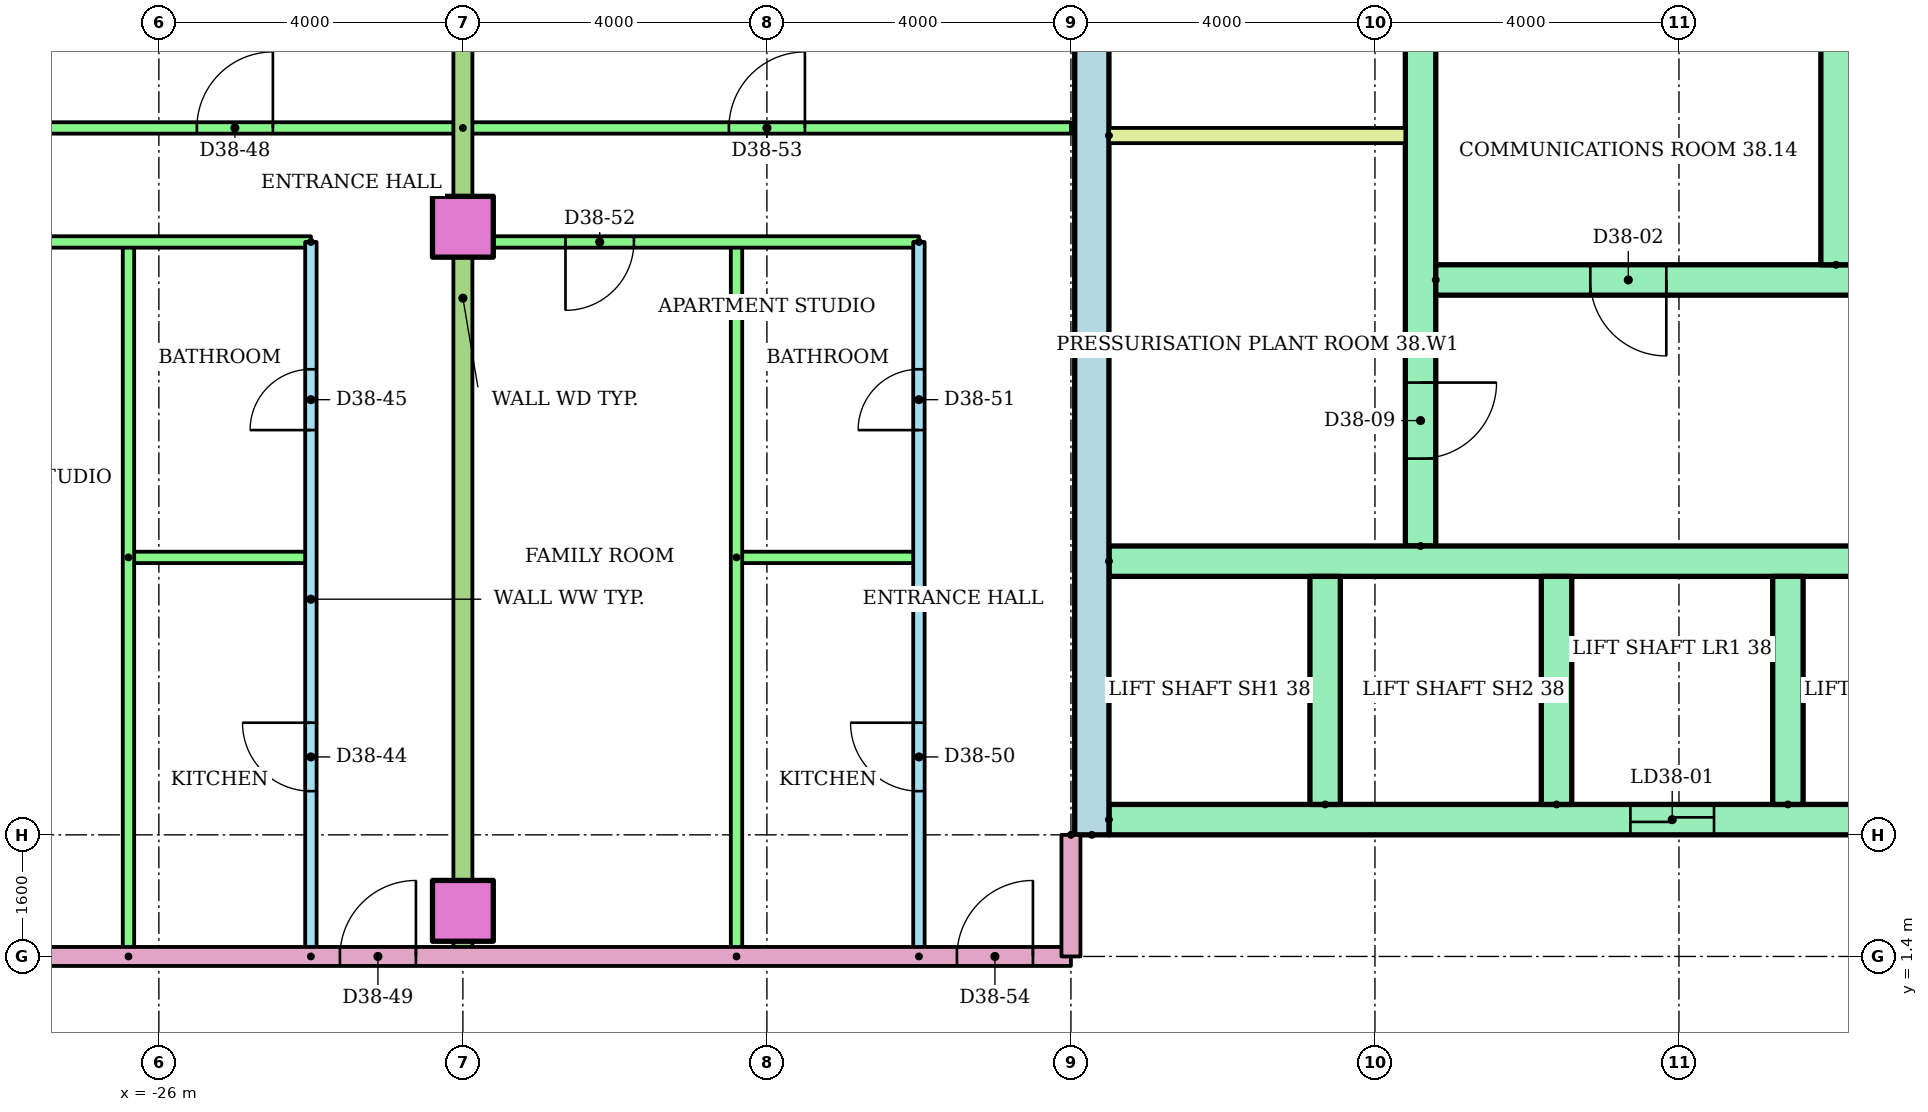
"""IFC4 building model, lengths in metres.
Left out: names, types, materials, properties, quantities, classifications, styles, units other than length and angle.
Written with IfcOpenShell. Run it as: python <this file> out.ifc"""

import sys

from ifc_helpers import new_model, si_unit, direction, frame, frame_2d, origin, origin_2d, place, context, subcontext, project, spatial, rectangle, extrude, element, fill, save


model = new_model("IFC4")
c1 = context("Model", 3, precision=1e-05, world=origin(), true_north=direction((0.0, 1.0)))
c2 = subcontext(c1, "Body", "Model", "MODEL_VIEW")
j1 = project(units=[si_unit("LENGTHUNIT", "METRE"), si_unit("PLANEANGLEUNIT", "RADIAN")], contexts=[c1])
p1 = place(None, origin())
s1 = spatial("IfcSite", under=j1, at=p1, CompositionType="ELEMENT")
p2 = place(p1, origin())
s2 = spatial("IfcBuilding", under=s1, at=p2, CompositionType="ELEMENT")
p3 = place(p2, frame((0.0, 0.0, 145.4)))
s3 = spatial("IfcBuildingStorey", under=s2, at=p3, CompositionType="ELEMENT", Elevation=145.4)
for number, where in (
    (1, (-22.0, 2.0, 0.0)),
    (2, (-22.0, 11.0, 0.0)),
):
    element("IfcColumn", number, at=place(p3, frame(where)), inside=s3, PredefinedType="COLUMN", context=c2, shape_type="SweptSolid", body=[
        extrude(rectangle(XDim=0.8, YDim=0.8, at=origin_2d()), origin(), (0.0, 0.0, 1.0), 3.2),
    ])
p4 = place(p3, frame((-13.725, 3.0, 0.0), z_axis=(0.0, 0.0, 1.0), x_axis=(0.0, 1.0, 0.0)))
e3 = element("IfcWall", 3, at=p4, inside=s3, PredefinedType="SHEAR", context=c2, shape_type="SweptSolid", body=[
    extrude(rectangle(XDim=17.0, YDim=0.45, at=frame_2d((8.5, 0.0))), origin(), (0.0, 0.0, 1.0), 2.92),
])
p5 = place(p3, frame((-9.4, 6.8, 0.0), z_axis=(0.0, 0.0, 1.0), x_axis=(0.0, 1.0, 0.0)))
e4 = element("IfcWall", 4, at=p5, inside=s3, PredefinedType="SHEAR", context=c2, shape_type="SweptSolid", body=[
    extrude(rectangle(XDim=12.7, YDim=0.4, at=frame_2d((6.35, 0.0))), origin(), (0.0, 0.0, 1.0), 2.92),
])
p6 = place(p5, frame((1.15, 0.0, 0.0)))
e5 = element("IfcOpeningElement", 5, at=p6, cuts=e4, PredefinedType="OPENING", context=c2, shape_type="SweptSolid", body=[
    extrude(rectangle(XDim=1.0, YDim=2.1, at=frame_2d((0.5, 1.05))), frame((0.0, 0.21, 0.0), z_axis=(0.0, -1.0, 0.0), x_axis=(1.0, 0.0, 0.0)), (0.0, 0.0, 1.0), 0.42),
])
p7 = place(p5, frame((7.925, 0.0, 0.0)))
e6 = element("IfcOpeningElement", 6, at=p7, cuts=e4, PredefinedType="OPENING", context=c2, shape_type="SweptSolid", body=[
    extrude(rectangle(XDim=1.0, YDim=2.1, at=frame_2d((0.5, 1.05))), frame((0.0, 0.21, 0.0), z_axis=(0.0, -1.0, 0.0), x_axis=(1.0, 0.0, 0.0)), (0.0, 0.0, 1.0), 0.42),
])
p8 = place(p3, frame((-13.5, 3.2, 0.0)))
e7 = element("IfcWall", 7, at=p8, inside=s3, PredefinedType="SHEAR", context=c2, shape_type="SweptSolid", body=[
    extrude(rectangle(XDim=27.0, YDim=0.4, at=frame_2d((13.5, 0.0))), origin(), (0.0, 0.0, 1.0), 2.92),
])
p9 = place(p8, frame((6.861, 0.0, 0.0)))
e8 = element("IfcOpeningElement", 8, at=p9, cuts=e7, PredefinedType="OPENING", context=c2, shape_type="SweptSolid", body=[
    extrude(rectangle(XDim=1.1, YDim=2.1, at=frame_2d((0.55, 1.05))), frame((0.0, 0.21, 0.0), z_axis=(0.0, -1.0, 0.0), x_axis=(1.0, 0.0, 0.0)), (0.0, 0.0, 1.0), 0.42),
])
p10 = place(p8, frame((9.906, 0.0, 0.0)))
e9 = element("IfcOpeningElement", 9, at=p10, cuts=e7, PredefinedType="OPENING", context=c2, shape_type="SweptSolid", body=[
    extrude(rectangle(XDim=1.1, YDim=2.1, at=frame_2d((0.55, 1.05))), frame((0.0, 0.21, 0.0), z_axis=(0.0, -1.0, 0.0), x_axis=(1.0, 0.0, 0.0)), (0.0, 0.0, 1.0), 0.42),
])
p11 = place(p8, frame((15.994, 0.0, 0.0)))
e10 = element("IfcOpeningElement", 10, at=p11, cuts=e7, PredefinedType="OPENING", context=c2, shape_type="SweptSolid", body=[
    extrude(rectangle(XDim=1.1, YDim=2.1, at=frame_2d((0.55, 1.05))), frame((0.0, 0.21, 0.0), z_axis=(0.0, -1.0, 0.0), x_axis=(1.0, 0.0, 0.0)), (0.0, 0.0, 1.0), 0.42),
])
p12 = place(p8, frame((19.039, 0.0, 0.0)))
e11 = element("IfcOpeningElement", 11, at=p12, cuts=e7, PredefinedType="OPENING", context=c2, shape_type="SweptSolid", body=[
    extrude(rectangle(XDim=1.1, YDim=2.1, at=frame_2d((0.55, 1.05))), frame((0.0, 0.21, 0.0), z_axis=(0.0, -1.0, 0.0), x_axis=(1.0, 0.0, 0.0)), (0.0, 0.0, 1.0), 0.42),
])
p13 = place(p8, frame((12.6, 0.0, 0.0)))
e12 = element("IfcOpeningElement", 12, at=p13, cuts=e7, PredefinedType="OPENING", context=c2, shape_type="SweptSolid", body=[
    extrude(rectangle(XDim=1.8, YDim=2.1, at=frame_2d((0.9, 1.05))), frame((0.0, 0.21, 0.0), z_axis=(0.0, -1.0, 0.0), x_axis=(1.0, 0.0, 0.0)), (0.0, 0.0, 1.0), 0.42),
])
p14 = place(p3, frame((-13.5, 6.6, 0.0)))
e13 = element("IfcWall", 13, at=p14, inside=s3, PredefinedType="SHEAR", context=c2, shape_type="SweptSolid", body=[
    extrude(rectangle(XDim=11.978, YDim=0.4, at=frame_2d((5.989, 0.0))), origin(), (0.0, 0.0, 1.0), 2.92),
])
for number, where, z_axis, x_axis in (
    (14, (-10.656, 3.4, 0.0), (0.0, 0.0, 1.0), (0.0, 1.0, 0.0)),
    (15, (-7.611, 3.4, 0.0), (0.0, 0.0, 1.0), (0.0, 1.0, 0.0)),
    (16, (-4.567, 3.4, 0.0), (0.0, 0.0, 1.0), (0.0, 1.0, 0.0)),
):
    element("IfcWall", number, at=place(p3, frame(where, z_axis=z_axis, x_axis=x_axis)), inside=s3, PredefinedType="SHEAR", context=c2, shape_type="SweptSolid", body=[
        extrude(rectangle(XDim=3.0, YDim=0.4, at=frame_2d((1.5, 0.0))), origin(), (0.0, 0.0, 1.0), 2.92),
    ])
p15 = place(p3, frame((-9.2, 10.3, 0.0)))
e17 = element("IfcWall", 17, at=p15, inside=s3, PredefinedType="SHEAR", context=c2, shape_type="SweptSolid", body=[
    extrude(rectangle(XDim=8.0, YDim=0.4, at=frame_2d((4.0, 0.0))), origin(), (0.0, 0.0, 1.0), 2.92),
])
p16 = place(p15, frame((2.033, 0.0, 0.0)))
e18 = element("IfcOpeningElement", 18, at=p16, cuts=e17, PredefinedType="OPENING", context=c2, shape_type="SweptSolid", body=[
    extrude(rectangle(XDim=1.0, YDim=2.1, at=frame_2d((0.5, 1.05))), frame((0.0, 0.21, 0.0), z_axis=(0.0, -1.0, 0.0), x_axis=(1.0, 0.0, 0.0)), (0.0, 0.0, 1.0), 0.42),
])
p17 = place(p15, frame((6.133, 0.0, 0.0)))
e19 = element("IfcOpeningElement", 19, at=p17, cuts=e17, PredefinedType="OPENING", context=c2, shape_type="SweptSolid", body=[
    extrude(rectangle(XDim=1.0, YDim=2.1, at=frame_2d((0.5, 1.05))), frame((0.0, 0.21, 0.0), z_axis=(0.0, -1.0, 0.0), x_axis=(1.0, 0.0, 0.0)), (0.0, 0.0, 1.0), 0.42),
])
p18 = place(p3, frame((-3.933, 10.5, 0.0), z_axis=(0.0, 0.0, 1.0), x_axis=(0.0, 1.0, 0.0)))
e20 = element("IfcWall", 20, at=p18, inside=s3, PredefinedType="SHEAR", context=c2, shape_type="SweptSolid", body=[
    extrude(rectangle(XDim=3.0, YDim=0.4, at=frame_2d((1.5, 0.0))), origin(), (0.0, 0.0, 1.0), 2.92),
])
p19 = place(p3, frame((-13.5, 12.2, 0.0)))
e21 = element("IfcWall", 21, at=p19, inside=s3, PredefinedType="PARTITIONING", context=c2, shape_type="SweptSolid", body=[
    extrude(rectangle(XDim=3.9, YDim=0.2, at=frame_2d((1.95, 0.0))), origin(), (0.0, 0.0, 1.0), 2.92),
])
p20 = place(p3, frame((-24.0, 1.4, 0.0), z_axis=(0.0, 0.0, 1.0), x_axis=(0.0, 1.0, 0.0)))
e22 = element("IfcWall", 22, at=p20, inside=s3, PredefinedType="PARTITIONING", context=c2, shape_type="SweptSolid", body=[
    extrude(rectangle(XDim=9.4, YDim=0.15, at=frame_2d((4.7, 0.0))), origin(), (0.0, 0.0, 1.0), 2.4),
])
p21 = place(p20, frame((2.175, 0.0, 0.0)))
e23 = element("IfcOpeningElement", 23, at=p21, cuts=e22, PredefinedType="OPENING", context=c2, shape_type="SweptSolid", body=[
    extrude(rectangle(XDim=0.9, YDim=2.1, at=frame_2d((0.45, 1.05))), frame((0.0, 0.085, 0.0), z_axis=(0.0, -1.0, 0.0), x_axis=(1.0, 0.0, 0.0)), (0.0, 0.0, 1.0), 0.17),
])
p22 = place(p20, frame((6.925, 0.0, 0.0)))
e24 = element("IfcOpeningElement", 24, at=p22, cuts=e22, PredefinedType="OPENING", context=c2, shape_type="SweptSolid", body=[
    extrude(rectangle(XDim=0.8, YDim=2.1, at=frame_2d((0.4, 1.05))), frame((0.0, 0.085, 0.0), z_axis=(0.0, -1.0, 0.0), x_axis=(1.0, 0.0, 0.0)), (0.0, 0.0, 1.0), 0.17),
])
p23 = place(p3, frame((-26.4, 6.65, 0.0)))
e25 = element("IfcWall", 25, at=p23, inside=s3, PredefinedType="PARTITIONING", context=c2, shape_type="SweptSolid", body=[
    extrude(rectangle(XDim=2.4, YDim=0.15, at=frame_2d((1.2, 0.0))), origin(), (0.0, 0.0, 1.0), 2.4),
])
p24 = place(p3, frame((-26.4, 1.4, 0.0), z_axis=(0.0, 0.0, 1.0), x_axis=(0.0, 1.0, 0.0)))
e26 = element("IfcWall", 26, at=p24, inside=s3, PredefinedType="PARTITIONING", context=c2, shape_type="SweptSolid", body=[
    extrude(rectangle(XDim=9.4, YDim=0.15, at=frame_2d((4.7, 0.0))), origin(), (0.0, 0.0, 1.0), 2.4),
])
p25 = place(p3, frame((-24.0, 10.8, 0.0), z_axis=(0.0, 0.0, 1.0), x_axis=(-1.0, 0.0, 0.0)))
e27 = element("IfcWall", 27, at=p25, inside=s3, PredefinedType="PARTITIONING", context=c2, shape_type="SweptSolid", body=[
    extrude(rectangle(XDim=8.72, YDim=0.15, at=frame_2d((4.36, 0.0))), origin(), (0.0, 0.0, 1.0), 2.4),
])
p26 = place(p25, frame((4.482, 0.0, 0.0)))
e28 = element("IfcOpeningElement", 28, at=p26, cuts=e27, PredefinedType="OPENING", context=c2, shape_type="SweptSolid", body=[
    extrude(rectangle(XDim=0.9, YDim=2.1, at=frame_2d((0.45, 1.05))), frame((0.0, 0.085, 0.0), z_axis=(0.0, -1.0, 0.0), x_axis=(1.0, 0.0, 0.0)), (0.0, 0.0, 1.0), 0.17),
])
p27 = place(p3, frame((-32.72, 12.3, 0.0)))
e29 = element("IfcWall", 29, at=p27, inside=s3, PredefinedType="PARTITIONING", context=c2, shape_type="SweptSolid", body=[
    extrude(rectangle(XDim=10.72, YDim=0.15, at=frame_2d((5.36, 0.0))), origin(), (0.0, 0.0, 1.0), 2.4),
])
p28 = place(p27, frame((1.102, 0.0, 0.0)))
e30 = element("IfcOpeningElement", 30, at=p28, cuts=e29, PredefinedType="OPENING", context=c2, shape_type="SweptSolid", body=[
    extrude(rectangle(XDim=1.0, YDim=2.1, at=frame_2d((0.5, 1.05))), frame((0.0, 0.085, 0.0), z_axis=(0.0, -1.0, 0.0), x_axis=(1.0, 0.0, 0.0)), (0.0, 0.0, 1.0), 0.17),
])
p29 = place(p27, frame((7.22, 0.0, 0.0)))
e31 = element("IfcOpeningElement", 31, at=p29, cuts=e29, PredefinedType="OPENING", context=c2, shape_type="SweptSolid", body=[
    extrude(rectangle(XDim=1.0, YDim=2.1, at=frame_2d((0.5, 1.05))), frame((0.0, 0.085, 0.0), z_axis=(0.0, -1.0, 0.0), x_axis=(1.0, 0.0, 0.0)), (0.0, 0.0, 1.0), 0.17),
])
p30 = place(p3, frame((-16.0, 1.4, 0.0), z_axis=(0.0, 0.0, 1.0), x_axis=(0.0, 1.0, 0.0)))
e32 = element("IfcWall", 32, at=p30, inside=s3, PredefinedType="PARTITIONING", context=c2, shape_type="SweptSolid", body=[
    extrude(rectangle(XDim=9.4, YDim=0.15, at=frame_2d((4.7, 0.0))), origin(), (0.0, 0.0, 1.0), 2.4),
])
p31 = place(p30, frame((2.175, 0.0, 0.0)))
e33 = element("IfcOpeningElement", 33, at=p31, cuts=e32, PredefinedType="OPENING", context=c2, shape_type="SweptSolid", body=[
    extrude(rectangle(XDim=0.9, YDim=2.1, at=frame_2d((0.45, 1.05))), frame((0.0, 0.085, 0.0), z_axis=(0.0, -1.0, 0.0), x_axis=(1.0, 0.0, 0.0)), (0.0, 0.0, 1.0), 0.17),
])
p32 = place(p30, frame((6.925, 0.0, 0.0)))
e34 = element("IfcOpeningElement", 34, at=p32, cuts=e32, PredefinedType="OPENING", context=c2, shape_type="SweptSolid", body=[
    extrude(rectangle(XDim=0.8, YDim=2.1, at=frame_2d((0.4, 1.05))), frame((0.0, 0.085, 0.0), z_axis=(0.0, -1.0, 0.0), x_axis=(1.0, 0.0, 0.0)), (0.0, 0.0, 1.0), 0.17),
])
p33 = place(p3, frame((-18.4, 6.65, 0.0)))
e35 = element("IfcWall", 35, at=p33, inside=s3, PredefinedType="PARTITIONING", context=c2, shape_type="SweptSolid", body=[
    extrude(rectangle(XDim=2.4, YDim=0.15, at=frame_2d((1.2, 0.0))), origin(), (0.0, 0.0, 1.0), 2.4),
])
p34 = place(p3, frame((-18.4, 1.4, 0.0), z_axis=(0.0, 0.0, 1.0), x_axis=(0.0, 1.0, 0.0)))
e36 = element("IfcWall", 36, at=p34, inside=s3, PredefinedType="PARTITIONING", context=c2, shape_type="SweptSolid", body=[
    extrude(rectangle(XDim=9.4, YDim=0.15, at=frame_2d((4.7, 0.0))), origin(), (0.0, 0.0, 1.0), 2.4),
])
p35 = place(p3, frame((-16.0, 10.8, 0.0), z_axis=(0.0, 0.0, 1.0), x_axis=(-1.0, 0.0, 0.0)))
e37 = element("IfcWall", 37, at=p35, inside=s3, PredefinedType="PARTITIONING", context=c2, shape_type="SweptSolid", body=[
    extrude(rectangle(XDim=6.0, YDim=0.15, at=frame_2d((3.0, 0.0))), origin(), (0.0, 0.0, 1.0), 2.4),
])
p36 = place(p35, frame((3.75, 0.0, 0.0)))
e38 = element("IfcOpeningElement", 38, at=p36, cuts=e37, PredefinedType="OPENING", context=c2, shape_type="SweptSolid", body=[
    extrude(rectangle(XDim=0.9, YDim=2.1, at=frame_2d((0.45, 1.05))), frame((0.0, 0.085, 0.0), z_axis=(0.0, -1.0, 0.0), x_axis=(1.0, 0.0, 0.0)), (0.0, 0.0, 1.0), 0.17),
])
p37 = place(p3, frame((-22.0, 12.3, 0.0)))
e39 = element("IfcWall", 39, at=p37, inside=s3, PredefinedType="PARTITIONING", context=c2, shape_type="SweptSolid", body=[
    extrude(rectangle(XDim=8.0, YDim=0.15, at=frame_2d((4.0, 0.0))), origin(), (0.0, 0.0, 1.0), 2.4),
])
p38 = place(p37, frame((3.5, 0.0, 0.0)))
e40 = element("IfcOpeningElement", 40, at=p38, cuts=e39, PredefinedType="OPENING", context=c2, shape_type="SweptSolid", body=[
    extrude(rectangle(XDim=1.0, YDim=2.1, at=frame_2d((0.5, 1.05))), frame((0.0, 0.085, 0.0), z_axis=(0.0, -1.0, 0.0), x_axis=(1.0, 0.0, 0.0)), (0.0, 0.0, 1.0), 0.17),
])
p39 = place(p3, frame((-22.0, 18.721, 0.0), z_axis=(0.0, 0.0, 1.0), x_axis=(0.0, -1.0, 0.0)))
e41 = element("IfcWall", 41, at=p39, inside=s3, PredefinedType="PARTITIONING", context=c2, shape_type="SweptSolid", body=[
    extrude(rectangle(XDim=17.321, YDim=0.25, at=frame_2d((8.661, 0.0))), origin(), (0.0, 0.0, 1.0), 2.4),
])
p40 = place(p3, frame((-29.0, 1.4, 0.0)))
e42 = element("IfcWall", 42, at=p40, inside=s3, PredefinedType="PARTITIONING", context=c2, shape_type="SweptSolid", body=[
    extrude(rectangle(XDim=15.0, YDim=0.25, at=frame_2d((7.5, 0.0))), origin(), (0.0, 0.0, 1.0), 2.4),
])
p41 = place(p40, frame((5.382, 0.0, 0.0)))
e43 = element("IfcOpeningElement", 43, at=p41, cuts=e42, PredefinedType="OPENING", context=c2, shape_type="SweptSolid", body=[
    extrude(rectangle(XDim=1.0, YDim=2.1, at=frame_2d((0.5, 1.05))), frame((0.0, 0.135, 0.0), z_axis=(0.0, -1.0, 0.0), x_axis=(1.0, 0.0, 0.0)), (0.0, 0.0, 1.0), 0.27),
])
p42 = place(p40, frame((13.5, 0.0, 0.0)))
e44 = element("IfcOpeningElement", 44, at=p42, cuts=e42, PredefinedType="OPENING", context=c2, shape_type="SweptSolid", body=[
    extrude(rectangle(XDim=1.0, YDim=2.1, at=frame_2d((0.5, 1.05))), frame((0.0, 0.135, 0.0), z_axis=(0.0, -1.0, 0.0), x_axis=(1.0, 0.0, 0.0)), (0.0, 0.0, 1.0), 0.27),
])
p43 = place(p3, frame((-14.0, 3.0, 0.0), z_axis=(0.0, 0.0, 1.0), x_axis=(0.0, -1.0, 0.0)))
e45 = element("IfcWall", 45, at=p43, inside=s3, PredefinedType="PARTITIONING", context=c2, shape_type="SweptSolid", body=[
    extrude(rectangle(XDim=1.6, YDim=0.25, at=frame_2d((0.8, 0.0))), origin(), (0.0, 0.0, 1.0), 2.4),
])
p44 = place(p9, origin())
e46 = element("IfcDoor", 46, at=p44, inside=s3, OperationType="SLIDING_TO_LEFT", PredefinedType="DOOR", context=c2, shape_type="SweptSolid", body=[
    extrude(rectangle(XDim=1.1, YDim=2.1, at=frame_2d((0.55, 1.05))), frame((0.0, 0.025, 0.0), z_axis=(0.0, -1.0, 0.0), x_axis=(1.0, 0.0, 0.0)), (0.0, 0.0, 1.0), 0.05),
])
fill(e8, e46)
p45 = place(p16, frame((1.0, 0.0, 0.0), z_axis=(0.0, 0.0, 1.0), x_axis=(-1.0, 0.0, 0.0)))
e47 = element("IfcDoor", 47, at=p45, inside=s3, OperationType="SINGLE_SWING_RIGHT", PredefinedType="DOOR", context=c2, shape_type="SweptSolid", body=[
    extrude(rectangle(XDim=1.0, YDim=2.1, at=frame_2d((0.5, 1.05))), frame((0.0, 0.025, 0.0), z_axis=(0.0, -1.0, 0.0), x_axis=(1.0, 0.0, 0.0)), (0.0, 0.0, 1.0), 0.05),
])
fill(e18, e47)
p46 = place(p6, frame((1.0, 0.0, 0.0), z_axis=(0.0, 0.0, 1.0), x_axis=(-1.0, 0.0, 0.0)))
e48 = element("IfcDoor", 48, at=p46, inside=s3, OperationType="SINGLE_SWING_RIGHT", PredefinedType="DOOR", context=c2, shape_type="SweptSolid", body=[
    extrude(rectangle(XDim=1.0, YDim=2.1, at=frame_2d((0.5, 1.05))), frame((0.0, 0.025, 0.0), z_axis=(0.0, -1.0, 0.0), x_axis=(1.0, 0.0, 0.0)), (0.0, 0.0, 1.0), 0.05),
])
fill(e5, e48)
p47 = place(p21, origin())
e49 = element("IfcDoor", 49, at=p47, inside=s3, OperationType="SINGLE_SWING_RIGHT", PredefinedType="DOOR", context=c2, shape_type="SweptSolid", body=[
    extrude(rectangle(XDim=0.9, YDim=2.1, at=frame_2d((0.45, 1.05))), frame((0.0, 0.025, 0.0), z_axis=(0.0, -1.0, 0.0), x_axis=(1.0, 0.0, 0.0)), (0.0, 0.0, 1.0), 0.05),
])
fill(e23, e49)
p48 = place(p22, origin())
e50 = element("IfcDoor", 50, at=p48, inside=s3, OperationType="SINGLE_SWING_LEFT", PredefinedType="DOOR", context=c2, shape_type="SweptSolid", body=[
    extrude(rectangle(XDim=0.8, YDim=2.1, at=frame_2d((0.4, 1.05))), frame((0.0, 0.025, 0.0), z_axis=(0.0, -1.0, 0.0), x_axis=(1.0, 0.0, 0.0)), (0.0, 0.0, 1.0), 0.05),
])
fill(e24, e50)
p49 = place(p29, origin())
e51 = element("IfcDoor", 51, at=p49, inside=s3, OperationType="SINGLE_SWING_RIGHT", PredefinedType="DOOR", context=c2, shape_type="SweptSolid", body=[
    extrude(rectangle(XDim=1.0, YDim=2.1, at=frame_2d((0.5, 1.05))), frame((0.0, 0.025, 0.0), z_axis=(0.0, -1.0, 0.0), x_axis=(1.0, 0.0, 0.0)), (0.0, 0.0, 1.0), 0.05),
])
fill(e31, e51)
p50 = place(p41, origin())
e52 = element("IfcDoor", 52, at=p50, inside=s3, OperationType="SINGLE_SWING_RIGHT", PredefinedType="DOOR", context=c2, shape_type="SweptSolid", body=[
    extrude(rectangle(XDim=1.0, YDim=2.1, at=frame_2d((0.5, 1.05))), frame((0.0, 0.025, 0.0), z_axis=(0.0, -1.0, 0.0), x_axis=(1.0, 0.0, 0.0)), (0.0, 0.0, 1.0), 0.05),
])
fill(e43, e52)
p51 = place(p31, origin())
e53 = element("IfcDoor", 53, at=p51, inside=s3, OperationType="SINGLE_SWING_RIGHT", PredefinedType="DOOR", context=c2, shape_type="SweptSolid", body=[
    extrude(rectangle(XDim=0.9, YDim=2.1, at=frame_2d((0.45, 1.05))), frame((0.0, 0.025, 0.0), z_axis=(0.0, -1.0, 0.0), x_axis=(1.0, 0.0, 0.0)), (0.0, 0.0, 1.0), 0.05),
])
fill(e33, e53)
p52 = place(p32, origin())
e54 = element("IfcDoor", 54, at=p52, inside=s3, OperationType="SINGLE_SWING_LEFT", PredefinedType="DOOR", context=c2, shape_type="SweptSolid", body=[
    extrude(rectangle(XDim=0.8, YDim=2.1, at=frame_2d((0.4, 1.05))), frame((0.0, 0.025, 0.0), z_axis=(0.0, -1.0, 0.0), x_axis=(1.0, 0.0, 0.0)), (0.0, 0.0, 1.0), 0.05),
])
fill(e34, e54)
p53 = place(p36, origin())
e55 = element("IfcDoor", 55, at=p53, inside=s3, OperationType="SINGLE_SWING_RIGHT", PredefinedType="DOOR", context=c2, shape_type="SweptSolid", body=[
    extrude(rectangle(XDim=0.9, YDim=2.1, at=frame_2d((0.45, 1.05))), frame((0.0, 0.025, 0.0), z_axis=(0.0, -1.0, 0.0), x_axis=(1.0, 0.0, 0.0)), (0.0, 0.0, 1.0), 0.05),
])
fill(e38, e55)
p54 = place(p38, origin())
e56 = element("IfcDoor", 56, at=p54, inside=s3, OperationType="SINGLE_SWING_RIGHT", PredefinedType="DOOR", context=c2, shape_type="SweptSolid", body=[
    extrude(rectangle(XDim=1.0, YDim=2.1, at=frame_2d((0.5, 1.05))), frame((0.0, 0.025, 0.0), z_axis=(0.0, -1.0, 0.0), x_axis=(1.0, 0.0, 0.0)), (0.0, 0.0, 1.0), 0.05),
])
fill(e40, e56)
p55 = place(p42, origin())
e57 = element("IfcDoor", 57, at=p55, inside=s3, OperationType="SINGLE_SWING_RIGHT", PredefinedType="DOOR", context=c2, shape_type="SweptSolid", body=[
    extrude(rectangle(XDim=1.0, YDim=2.1, at=frame_2d((0.5, 1.05))), frame((0.0, 0.025, 0.0), z_axis=(0.0, -1.0, 0.0), x_axis=(1.0, 0.0, 0.0)), (0.0, 0.0, 1.0), 0.05),
])
fill(e44, e57)
save(model, sys.argv[1])
